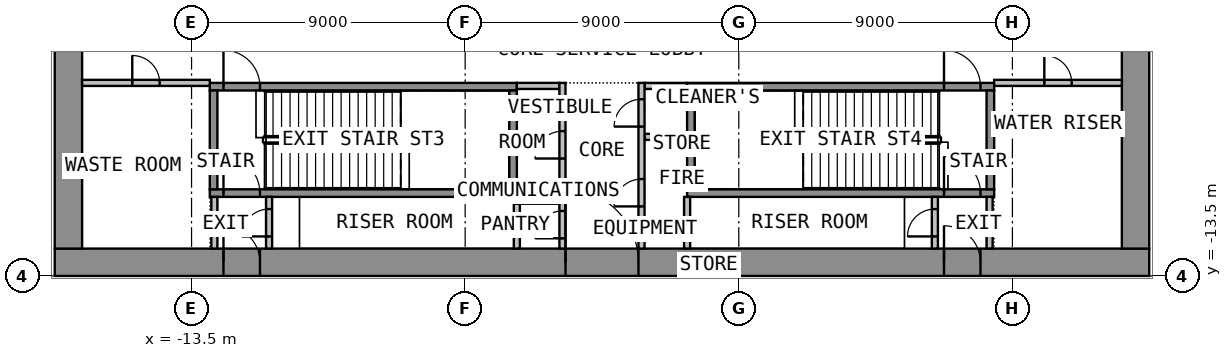
"""IFC4 building model, lengths in metres.
Left out: names, types, materials, properties, quantities, classifications, styles, units other than length and angle.
Written with IfcOpenShell. Run it as: python <this file> out.ifc"""

import sys

from ifc_helpers import new_model, si_unit, direction, frame, frame_2d, origin, place, context, subcontext, project, spatial, rectangle, extrude, element, fill, save


model = new_model("IFC4")
c1 = context("Model", 3, precision=1e-05, world=origin(), true_north=direction((0.0, 1.0)))
c2 = subcontext(c1, "Body", "Model", "MODEL_VIEW")
j1 = project(units=[si_unit("LENGTHUNIT", "METRE"), si_unit("PLANEANGLEUNIT", "RADIAN")], contexts=[c1])
p1 = place(None, origin())
s1 = spatial("IfcSite", under=j1, at=p1, CompositionType="ELEMENT")
p2 = place(p1, origin())
s2 = spatial("IfcBuilding", under=s1, at=p2, CompositionType="ELEMENT")
p3 = place(p2, origin())
s3 = spatial("IfcBuildingStorey", under=s2, at=p3, CompositionType="ELEMENT", Elevation=0.0)
p4 = place(p3, frame((-18.0, -13.05, 0.0), z_axis=(0.0, 0.0, 1.0), x_axis=(1.0, 0.0, 0.0)))
e1 = element("IfcWall", 1, at=p4, inside=s3, PredefinedType="SHEAR", context=c2, shape_type="SweptSolid", body=[
    extrude(rectangle(XDim=36.0, YDim=0.9, at=frame_2d((18.0, 0.0))), origin(), (0.0, 0.0, 1.0), 5.6),
])
p5 = place(p4, frame((16.8, 0.0, 0.0)))
e2 = element("IfcOpeningElement", 2, at=p5, cuts=e1, PredefinedType="OPENING", context=c2, shape_type="SweptSolid", body=[
    extrude(rectangle(XDim=2.4, YDim=2.1, at=frame_2d((1.2, 1.05))), frame((0.0, 0.46, 0.0), z_axis=(0.0, -1.0, 0.0), x_axis=(1.0, 0.0, 0.0)), (0.0, 0.0, 1.0), 0.92),
])
p6 = place(p4, frame((5.55, 0.0, 0.0)))
e3 = element("IfcOpeningElement", 3, at=p6, cuts=e1, PredefinedType="OPENING", context=c2, shape_type="SweptSolid", body=[
    extrude(rectangle(XDim=1.2, YDim=2.1, at=frame_2d((0.6, 1.05))), frame((0.0, 0.46, 0.0), z_axis=(0.0, -1.0, 0.0), x_axis=(1.0, 0.0, 0.0)), (0.0, 0.0, 1.0), 0.92),
])
p7 = place(p4, frame((29.25, 0.0, 0.0)))
e4 = element("IfcOpeningElement", 4, at=p7, cuts=e1, PredefinedType="OPENING", context=c2, shape_type="SweptSolid", body=[
    extrude(rectangle(XDim=1.2, YDim=2.1, at=frame_2d((0.6, 1.05))), frame((0.0, 0.46, 0.0), z_axis=(0.0, -1.0, 0.0), x_axis=(1.0, 0.0, 0.0)), (0.0, 0.0, 1.0), 0.92),
])
p8 = place(p3, frame((-17.55, -12.6, 0.0), z_axis=(0.0, 0.0, 1.0), x_axis=(0.0, 1.0, 0.0)))
e5 = element("IfcWall", 5, at=p8, inside=s3, PredefinedType="SHEAR", context=c2, shape_type="SweptSolid", body=[
    extrude(rectangle(XDim=25.2, YDim=0.9, at=frame_2d((12.6, 0.0))), origin(), (0.0, 0.0, 1.0), 5.6),
])
p9 = place(p8, frame((11.4, 0.0, 0.0)))
e6 = element("IfcOpeningElement", 6, at=p9, cuts=e5, PredefinedType="OPENING", context=c2, shape_type="SweptSolid", body=[
    extrude(rectangle(XDim=2.4, YDim=2.1, at=frame_2d((1.2, 1.05))), frame((0.0, 0.46, 0.0), z_axis=(0.0, -1.0, 0.0), x_axis=(1.0, 0.0, 0.0)), (0.0, 0.0, 1.0), 0.92),
])
p10 = place(p3, frame((17.55, -12.6, 0.0), z_axis=(0.0, 0.0, 1.0), x_axis=(0.0, 1.0, 0.0)))
e7 = element("IfcWall", 7, at=p10, inside=s3, PredefinedType="SHEAR", context=c2, shape_type="SweptSolid", body=[
    extrude(rectangle(XDim=25.2, YDim=0.9, at=frame_2d((12.6, 0.0))), origin(), (0.0, 0.0, 1.0), 5.6),
])
p11 = place(p10, frame((11.4, 0.0, 0.0)))
e8 = element("IfcOpeningElement", 8, at=p11, cuts=e7, PredefinedType="OPENING", context=c2, shape_type="SweptSolid", body=[
    extrude(rectangle(XDim=2.4, YDim=2.1, at=frame_2d((1.2, 1.05))), frame((0.0, 0.46, 0.0), z_axis=(0.0, -1.0, 0.0), x_axis=(1.0, 0.0, 0.0)), (0.0, 0.0, 1.0), 0.92),
])
p12 = place(p3, frame((-12.9, -10.775, 0.0), z_axis=(0.0, 0.0, 1.0), x_axis=(1.0, 0.0, 0.0)))
e9 = element("IfcWall", 9, at=p12, inside=s3, PredefinedType="SHEAR", context=c2, shape_type="SweptSolid", body=[
    extrude(rectangle(XDim=10.1, YDim=0.25, at=frame_2d((5.05, 0.0))), origin(), (0.0, 0.0, 1.0), 5.6),
])
p13 = place(p12, frame((0.45, 0.0, 0.0)))
e10 = element("IfcOpeningElement", 10, at=p13, cuts=e9, PredefinedType="OPENING", context=c2, shape_type="SweptSolid", body=[
    extrude(rectangle(XDim=1.2, YDim=2.1, at=frame_2d((0.6, 1.05))), frame((0.0, 0.135, 0.0), z_axis=(0.0, -1.0, 0.0), x_axis=(1.0, 0.0, 0.0)), (0.0, 0.0, 1.0), 0.27),
])
p14 = place(p3, frame((-12.9, -7.275, 0.0), z_axis=(0.0, 0.0, 1.0), x_axis=(1.0, 0.0, 0.0)))
e11 = element("IfcWall", 11, at=p14, inside=s3, PredefinedType="SHEAR", context=c2, shape_type="SweptSolid", body=[
    extrude(rectangle(XDim=10.1, YDim=0.25, at=frame_2d((5.05, 0.0))), origin(), (0.0, 0.0, 1.0), 5.6),
])
p15 = place(p14, frame((0.45, 0.0, 0.0)))
e12 = element("IfcOpeningElement", 12, at=p15, cuts=e11, PredefinedType="OPENING", context=c2, shape_type="SweptSolid", body=[
    extrude(rectangle(XDim=1.2, YDim=2.1, at=frame_2d((0.6, 1.05))), frame((0.0, 0.135, 0.0), z_axis=(0.0, -1.0, 0.0), x_axis=(1.0, 0.0, 0.0)), (0.0, 0.0, 1.0), 0.27),
])
for number, where, z_axis, x_axis in (
    (13, (-12.775, -10.65, 0.0), (0.0, 0.0, 1.0), (0.0, 1.0, 0.0)),
    (14, (-2.925, -10.65, 0.0), (0.0, 0.0, 1.0), (0.0, 1.0, 0.0)),
):
    element("IfcWall", number, at=place(p3, frame(where, z_axis=z_axis, x_axis=x_axis)), inside=s3, PredefinedType="SHEAR", context=c2, shape_type="SweptSolid", body=[
        extrude(rectangle(XDim=3.25, YDim=0.25, at=frame_2d((1.625, 0.0))), origin(), (0.0, 0.0, 1.0), 5.6),
    ])
p16 = place(p3, frame((2.8, -10.775, 0.0), z_axis=(0.0, 0.0, 1.0), x_axis=(1.0, 0.0, 0.0)))
e15 = element("IfcWall", 15, at=p16, inside=s3, PredefinedType="SHEAR", context=c2, shape_type="SweptSolid", body=[
    extrude(rectangle(XDim=10.1, YDim=0.25, at=frame_2d((5.05, 0.0))), origin(), (0.0, 0.0, 1.0), 5.6),
])
p17 = place(p16, frame((8.45, 0.0, 0.0)))
e16 = element("IfcOpeningElement", 16, at=p17, cuts=e15, PredefinedType="OPENING", context=c2, shape_type="SweptSolid", body=[
    extrude(rectangle(XDim=1.2, YDim=2.1, at=frame_2d((0.6, 1.05))), frame((0.0, 0.135, 0.0), z_axis=(0.0, -1.0, 0.0), x_axis=(1.0, 0.0, 0.0)), (0.0, 0.0, 1.0), 0.27),
])
p18 = place(p3, frame((2.8, -7.275, 0.0), z_axis=(0.0, 0.0, 1.0), x_axis=(1.0, 0.0, 0.0)))
e17 = element("IfcWall", 17, at=p18, inside=s3, PredefinedType="SHEAR", context=c2, shape_type="SweptSolid", body=[
    extrude(rectangle(XDim=10.1, YDim=0.25, at=frame_2d((5.05, 0.0))), origin(), (0.0, 0.0, 1.0), 5.6),
])
p19 = place(p18, frame((8.45, 0.0, 0.0)))
e18 = element("IfcOpeningElement", 18, at=p19, cuts=e17, PredefinedType="OPENING", context=c2, shape_type="SweptSolid", body=[
    extrude(rectangle(XDim=1.2, YDim=2.1, at=frame_2d((0.6, 1.05))), frame((0.0, 0.135, 0.0), z_axis=(0.0, -1.0, 0.0), x_axis=(1.0, 0.0, 0.0)), (0.0, 0.0, 1.0), 0.27),
])
for number, where, z_axis, x_axis in (
    (19, (2.925, -10.65, 0.0), (0.0, 0.0, 1.0), (0.0, 1.0, 0.0)),
    (20, (12.775, -10.65, 0.0), (0.0, 0.0, 1.0), (0.0, 1.0, 0.0)),
):
    element("IfcWall", number, at=place(p3, frame(where, z_axis=z_axis, x_axis=x_axis)), inside=s3, PredefinedType="SHEAR", context=c2, shape_type="SweptSolid", body=[
        extrude(rectangle(XDim=3.25, YDim=0.25, at=frame_2d((1.625, 0.0))), origin(), (0.0, 0.0, 1.0), 5.6),
    ])
for number, where, z_axis, x_axis in (
    (21, (-2.8, -7.25, 0.0), (0.0, 0.0, 1.0), (1.0, 0.0, 0.0)),
    (22, (-2.8, -11.025, 0.0), (0.0, 0.0, 1.0), (1.0, 0.0, 0.0)),
    (23, (1.4, -7.25, 0.0), (0.0, 0.0, 1.0), (1.0, 0.0, 0.0)),
    (24, (1.4, -8.925, 0.0), (0.0, 0.0, 1.0), (1.0, 0.0, 0.0)),
):
    element("IfcWall", number, at=place(p3, frame(where, z_axis=z_axis, x_axis=x_axis)), inside=s3, PredefinedType="PARTITIONING", context=c2, shape_type="SweptSolid", body=[
        extrude(rectangle(XDim=1.4, YDim=0.2, at=frame_2d((0.7, 0.0))), origin(), (0.0, 0.0, 1.0), 5.6),
    ])
p20 = place(p3, frame((-1.3, -12.6, 0.0), z_axis=(0.0, 0.0, 1.0), x_axis=(0.0, 1.0, 0.0)))
e25 = element("IfcWall", 25, at=p20, inside=s3, PredefinedType="PARTITIONING", context=c2, shape_type="SweptSolid", body=[
    extrude(rectangle(XDim=5.45, YDim=0.2, at=frame_2d((2.725, 0.0))), origin(), (0.0, 0.0, 1.0), 5.6),
])
p21 = place(p20, frame((0.337, 0.0, 0.0)))
e26 = element("IfcOpeningElement", 26, at=p21, cuts=e25, PredefinedType="OPENING", context=c2, shape_type="SweptSolid", body=[
    extrude(rectangle(XDim=0.9, YDim=2.1, at=frame_2d((0.45, 1.05))), frame((0.0, 0.11, 0.0), z_axis=(0.0, -1.0, 0.0), x_axis=(1.0, 0.0, 0.0)), (0.0, 0.0, 1.0), 0.22),
])
p22 = place(p20, frame((2.962, 0.0, 0.0)))
e27 = element("IfcOpeningElement", 27, at=p22, cuts=e25, PredefinedType="OPENING", context=c2, shape_type="SweptSolid", body=[
    extrude(rectangle(XDim=0.9, YDim=2.1, at=frame_2d((0.45, 1.05))), frame((0.0, 0.11, 0.0), z_axis=(0.0, -1.0, 0.0), x_axis=(1.0, 0.0, 0.0)), (0.0, 0.0, 1.0), 0.22),
])
p23 = place(p3, frame((1.3, -12.6, 0.0), z_axis=(0.0, 0.0, 1.0), x_axis=(0.0, 1.0, 0.0)))
e28 = element("IfcWall", 28, at=p23, inside=s3, PredefinedType="PARTITIONING", context=c2, shape_type="SweptSolid", body=[
    extrude(rectangle(XDim=5.45, YDim=0.2, at=frame_2d((2.725, 0.0))), origin(), (0.0, 0.0, 1.0), 5.6),
])
p24 = place(p23, frame((1.387, 0.0, 0.0)))
e29 = element("IfcOpeningElement", 29, at=p24, cuts=e28, PredefinedType="OPENING", context=c2, shape_type="SweptSolid", body=[
    extrude(rectangle(XDim=0.9, YDim=2.1, at=frame_2d((0.45, 1.05))), frame((0.0, 0.11, 0.0), z_axis=(0.0, -1.0, 0.0), x_axis=(1.0, 0.0, 0.0)), (0.0, 0.0, 1.0), 0.22),
])
p25 = place(p23, frame((4.012, 0.0, 0.0)))
e30 = element("IfcOpeningElement", 30, at=p25, cuts=e28, PredefinedType="OPENING", context=c2, shape_type="SweptSolid", body=[
    extrude(rectangle(XDim=0.9, YDim=2.1, at=frame_2d((0.45, 1.05))), frame((0.0, 0.11, 0.0), z_axis=(0.0, -1.0, 0.0), x_axis=(1.0, 0.0, 0.0)), (0.0, 0.0, 1.0), 0.22),
])
p26 = place(p3, frame((-12.75, -12.6, 0.0), z_axis=(0.0, 0.0, 1.0), x_axis=(0.0, 1.0, 0.0)))
e31 = element("IfcWall", 31, at=p26, inside=s3, PredefinedType="PARTITIONING", context=c2, shape_type="SweptSolid", body=[
    extrude(rectangle(XDim=1.7, YDim=0.2, at=frame_2d((0.85, 0.0))), origin(), (0.0, 0.0, 1.0), 5.6),
])
p27 = place(p3, frame((-10.95, -12.6, 0.0), z_axis=(0.0, 0.0, 1.0), x_axis=(0.0, 1.0, 0.0)))
e32 = element("IfcWall", 32, at=p27, inside=s3, PredefinedType="PARTITIONING", context=c2, shape_type="SweptSolid", body=[
    extrude(rectangle(XDim=1.7, YDim=0.2, at=frame_2d((0.85, 0.0))), origin(), (0.0, 0.0, 1.0), 5.6),
])
p28 = place(p27, frame((0.4, 0.0, 0.0)))
e33 = element("IfcOpeningElement", 33, at=p28, cuts=e32, PredefinedType="OPENING", context=c2, shape_type="SweptSolid", body=[
    extrude(rectangle(XDim=0.9, YDim=2.1, at=frame_2d((0.45, 1.05))), frame((0.0, 0.11, 0.0), z_axis=(0.0, -1.0, 0.0), x_axis=(1.0, 0.0, 0.0)), (0.0, 0.0, 1.0), 0.22),
])
p29 = place(p3, frame((12.75, -12.6, 0.0), z_axis=(0.0, 0.0, 1.0), x_axis=(0.0, 1.0, 0.0)))
e34 = element("IfcWall", 34, at=p29, inside=s3, PredefinedType="PARTITIONING", context=c2, shape_type="SweptSolid", body=[
    extrude(rectangle(XDim=1.7, YDim=0.2, at=frame_2d((0.85, 0.0))), origin(), (0.0, 0.0, 1.0), 5.6),
])
p30 = place(p3, frame((10.95, -12.6, 0.0), z_axis=(0.0, 0.0, 1.0), x_axis=(0.0, 1.0, 0.0)))
e35 = element("IfcWall", 35, at=p30, inside=s3, PredefinedType="PARTITIONING", context=c2, shape_type="SweptSolid", body=[
    extrude(rectangle(XDim=1.7, YDim=0.2, at=frame_2d((0.85, 0.0))), origin(), (0.0, 0.0, 1.0), 5.6),
])
p31 = place(p30, frame((0.4, 0.0, 0.0)))
e36 = element("IfcOpeningElement", 36, at=p31, cuts=e35, PredefinedType="OPENING", context=c2, shape_type="SweptSolid", body=[
    extrude(rectangle(XDim=0.9, YDim=2.1, at=frame_2d((0.45, 1.05))), frame((0.0, 0.11, 0.0), z_axis=(0.0, -1.0, 0.0), x_axis=(1.0, 0.0, 0.0)), (0.0, 0.0, 1.0), 0.22),
])
p32 = place(p3, frame((-17.1, -7.15, 0.0), z_axis=(0.0, 0.0, 1.0), x_axis=(1.0, 0.0, 0.0)))
e37 = element("IfcWall", 37, at=p32, inside=s3, PredefinedType="PARTITIONING", context=c2, shape_type="SweptSolid", body=[
    extrude(rectangle(XDim=4.2, YDim=0.2, at=frame_2d((2.1, 0.0))), origin(), (0.0, 0.0, 1.0), 5.6),
])
p33 = place(p32, frame((1.65, 0.0, 0.0)))
e38 = element("IfcOpeningElement", 38, at=p33, cuts=e37, PredefinedType="OPENING", context=c2, shape_type="SweptSolid", body=[
    extrude(rectangle(XDim=0.9, YDim=2.1, at=frame_2d((0.45, 1.05))), frame((0.0, 0.11, 0.0), z_axis=(0.0, -1.0, 0.0), x_axis=(1.0, 0.0, 0.0)), (0.0, 0.0, 1.0), 0.22),
])
p34 = place(p3, frame((12.9, -7.15, 0.0), z_axis=(0.0, 0.0, 1.0), x_axis=(1.0, 0.0, 0.0)))
e39 = element("IfcWall", 39, at=p34, inside=s3, PredefinedType="PARTITIONING", context=c2, shape_type="SweptSolid", body=[
    extrude(rectangle(XDim=4.2, YDim=0.2, at=frame_2d((2.1, 0.0))), origin(), (0.0, 0.0, 1.0), 5.6),
])
p35 = place(p34, frame((1.65, 0.0, 0.0)))
e40 = element("IfcOpeningElement", 40, at=p35, cuts=e39, PredefinedType="OPENING", context=c2, shape_type="SweptSolid", body=[
    extrude(rectangle(XDim=0.9, YDim=2.1, at=frame_2d((0.45, 1.05))), frame((0.0, 0.11, 0.0), z_axis=(0.0, -1.0, 0.0), x_axis=(1.0, 0.0, 0.0)), (0.0, 0.0, 1.0), 0.22),
])
p36 = place(p3, frame((-2.8, -12.599, 0.0), z_axis=(0.0, 0.0, 1.0), x_axis=(0.0, 1.0, 0.0)))
e41 = element("IfcWall", 41, at=p36, inside=s3, PredefinedType="PARTITIONING", context=c2, shape_type="SweptSolid", body=[
    extrude(rectangle(XDim=1.473, YDim=0.2, at=frame_2d((0.737, 0.0))), origin(), (0.0, 0.0, 1.0), 5.6),
])
p37 = place(p3, frame((2.8, -10.901, 0.0), z_axis=(0.0, 0.0, 1.0), x_axis=(0.0, -1.0, 0.0)))
e42 = element("IfcWall", 42, at=p37, inside=s3, PredefinedType="PARTITIONING", context=c2, shape_type="SweptSolid", body=[
    extrude(rectangle(XDim=1.698, YDim=0.2, at=frame_2d((0.849, 0.0))), origin(), (0.0, 0.0, 1.0), 5.6),
])
p38 = place(p5, origin())
e43 = element("IfcDoor", 43, at=p38, inside=s3, OperationType="DOUBLE_DOOR_DOUBLE_SWING", PredefinedType="DOOR", context=c2, shape_type="SweptSolid", body=[
    extrude(rectangle(XDim=2.4, YDim=2.1, at=frame_2d((1.2, 1.05))), frame((0.0, 0.025, 0.0), z_axis=(0.0, -1.0, 0.0), x_axis=(1.0, 0.0, 0.0)), (0.0, 0.0, 1.0), 0.05),
])
fill(e2, e43)
p39 = place(p6, origin())
e44 = element("IfcDoor", 44, at=p39, inside=s3, OperationType="SINGLE_SWING_RIGHT", PredefinedType="DOOR", context=c2, shape_type="SweptSolid", body=[
    extrude(rectangle(XDim=1.2, YDim=2.1, at=frame_2d((0.6, 1.05))), frame((0.0, 0.025, 0.0), z_axis=(0.0, -1.0, 0.0), x_axis=(1.0, 0.0, 0.0)), (0.0, 0.0, 1.0), 0.05),
])
fill(e3, e44)
p40 = place(p7, origin())
e45 = element("IfcDoor", 45, at=p40, inside=s3, OperationType="SINGLE_SWING_RIGHT", PredefinedType="DOOR", context=c2, shape_type="SweptSolid", body=[
    extrude(rectangle(XDim=1.2, YDim=2.1, at=frame_2d((0.6, 1.05))), frame((0.0, 0.025, 0.0), z_axis=(0.0, -1.0, 0.0), x_axis=(1.0, 0.0, 0.0)), (0.0, 0.0, 1.0), 0.05),
])
fill(e4, e45)
p41 = place(p15, origin())
e46 = element("IfcDoor", 46, at=p41, inside=s3, OperationType="SINGLE_SWING_LEFT", PredefinedType="DOOR", context=c2, shape_type="SweptSolid", body=[
    extrude(rectangle(XDim=1.2, YDim=2.1, at=frame_2d((0.6, 1.05))), frame((0.0, 0.025, 0.0), z_axis=(0.0, -1.0, 0.0), x_axis=(1.0, 0.0, 0.0)), (0.0, 0.0, 1.0), 0.05),
])
fill(e12, e46)
p42 = place(p19, origin())
e47 = element("IfcDoor", 47, at=p42, inside=s3, OperationType="SINGLE_SWING_LEFT", PredefinedType="DOOR", context=c2, shape_type="SweptSolid", body=[
    extrude(rectangle(XDim=1.2, YDim=2.1, at=frame_2d((0.6, 1.05))), frame((0.0, 0.025, 0.0), z_axis=(0.0, -1.0, 0.0), x_axis=(1.0, 0.0, 0.0)), (0.0, 0.0, 1.0), 0.05),
])
fill(e18, e47)
p43 = place(p21, origin())
e48 = element("IfcDoor", 48, at=p43, inside=s3, OperationType="SINGLE_SWING_LEFT", PredefinedType="DOOR", context=c2, shape_type="SweptSolid", body=[
    extrude(rectangle(XDim=0.9, YDim=2.1, at=frame_2d((0.45, 1.05))), frame((0.0, 0.025, 0.0), z_axis=(0.0, -1.0, 0.0), x_axis=(1.0, 0.0, 0.0)), (0.0, 0.0, 1.0), 0.05),
])
fill(e26, e48)
p44 = place(p22, origin())
e49 = element("IfcDoor", 49, at=p44, inside=s3, OperationType="SINGLE_SWING_LEFT", PredefinedType="DOOR", context=c2, shape_type="SweptSolid", body=[
    extrude(rectangle(XDim=0.9, YDim=2.1, at=frame_2d((0.45, 1.05))), frame((0.0, 0.025, 0.0), z_axis=(0.0, -1.0, 0.0), x_axis=(1.0, 0.0, 0.0)), (0.0, 0.0, 1.0), 0.05),
])
fill(e27, e49)
p45 = place(p24, origin())
e50 = element("IfcDoor", 50, at=p45, inside=s3, OperationType="SINGLE_SWING_LEFT", PredefinedType="DOOR", context=c2, shape_type="SweptSolid", body=[
    extrude(rectangle(XDim=0.9, YDim=2.1, at=frame_2d((0.45, 1.05))), frame((0.0, 0.025, 0.0), z_axis=(0.0, -1.0, 0.0), x_axis=(1.0, 0.0, 0.0)), (0.0, 0.0, 1.0), 0.05),
])
fill(e29, e50)
p46 = place(p25, origin())
e51 = element("IfcDoor", 51, at=p46, inside=s3, OperationType="SINGLE_SWING_LEFT", PredefinedType="DOOR", context=c2, shape_type="SweptSolid", body=[
    extrude(rectangle(XDim=0.9, YDim=2.1, at=frame_2d((0.45, 1.05))), frame((0.0, 0.025, 0.0), z_axis=(0.0, -1.0, 0.0), x_axis=(1.0, 0.0, 0.0)), (0.0, 0.0, 1.0), 0.05),
])
fill(e30, e51)
p47 = place(p13, origin())
e52 = element("IfcDoor", 52, at=p47, inside=s3, OperationType="SINGLE_SWING_RIGHT", PredefinedType="DOOR", context=c2, shape_type="SweptSolid", body=[
    extrude(rectangle(XDim=1.2, YDim=2.1, at=frame_2d((0.6, 1.05))), frame((0.0, 0.025, 0.0), z_axis=(0.0, -1.0, 0.0), x_axis=(1.0, 0.0, 0.0)), (0.0, 0.0, 1.0), 0.05),
])
fill(e10, e52)
p48 = place(p28, origin())
e53 = element("IfcDoor", 53, at=p48, inside=s3, OperationType="SINGLE_SWING_LEFT", PredefinedType="DOOR", context=c2, shape_type="SweptSolid", body=[
    extrude(rectangle(XDim=0.9, YDim=2.1, at=frame_2d((0.45, 1.05))), frame((0.0, 0.025, 0.0), z_axis=(0.0, -1.0, 0.0), x_axis=(1.0, 0.0, 0.0)), (0.0, 0.0, 1.0), 0.05),
])
fill(e33, e53)
p49 = place(p17, origin())
e54 = element("IfcDoor", 54, at=p49, inside=s3, OperationType="SINGLE_SWING_RIGHT", PredefinedType="DOOR", context=c2, shape_type="SweptSolid", body=[
    extrude(rectangle(XDim=1.2, YDim=2.1, at=frame_2d((0.6, 1.05))), frame((0.0, 0.025, 0.0), z_axis=(0.0, -1.0, 0.0), x_axis=(1.0, 0.0, 0.0)), (0.0, 0.0, 1.0), 0.05),
])
fill(e16, e54)
p50 = place(p31, origin())
e55 = element("IfcDoor", 55, at=p50, inside=s3, OperationType="SINGLE_SWING_LEFT", PredefinedType="DOOR", context=c2, shape_type="SweptSolid", body=[
    extrude(rectangle(XDim=0.9, YDim=2.1, at=frame_2d((0.45, 1.05))), frame((0.0, 0.025, 0.0), z_axis=(0.0, -1.0, 0.0), x_axis=(1.0, 0.0, 0.0)), (0.0, 0.0, 1.0), 0.05),
])
fill(e36, e55)
p51 = place(p33, origin())
e56 = element("IfcDoor", 56, at=p51, inside=s3, OperationType="SINGLE_SWING_LEFT", PredefinedType="DOOR", context=c2, shape_type="SweptSolid", body=[
    extrude(rectangle(XDim=0.9, YDim=2.1, at=frame_2d((0.45, 1.05))), frame((0.0, 0.025, 0.0), z_axis=(0.0, -1.0, 0.0), x_axis=(1.0, 0.0, 0.0)), (0.0, 0.0, 1.0), 0.05),
])
fill(e38, e56)
p52 = place(p35, origin())
e57 = element("IfcDoor", 57, at=p52, inside=s3, OperationType="SINGLE_SWING_LEFT", PredefinedType="DOOR", context=c2, shape_type="SweptSolid", body=[
    extrude(rectangle(XDim=0.9, YDim=2.1, at=frame_2d((0.45, 1.05))), frame((0.0, 0.025, 0.0), z_axis=(0.0, -1.0, 0.0), x_axis=(1.0, 0.0, 0.0)), (0.0, 0.0, 1.0), 0.05),
])
fill(e40, e57)
save(model, sys.argv[1])
